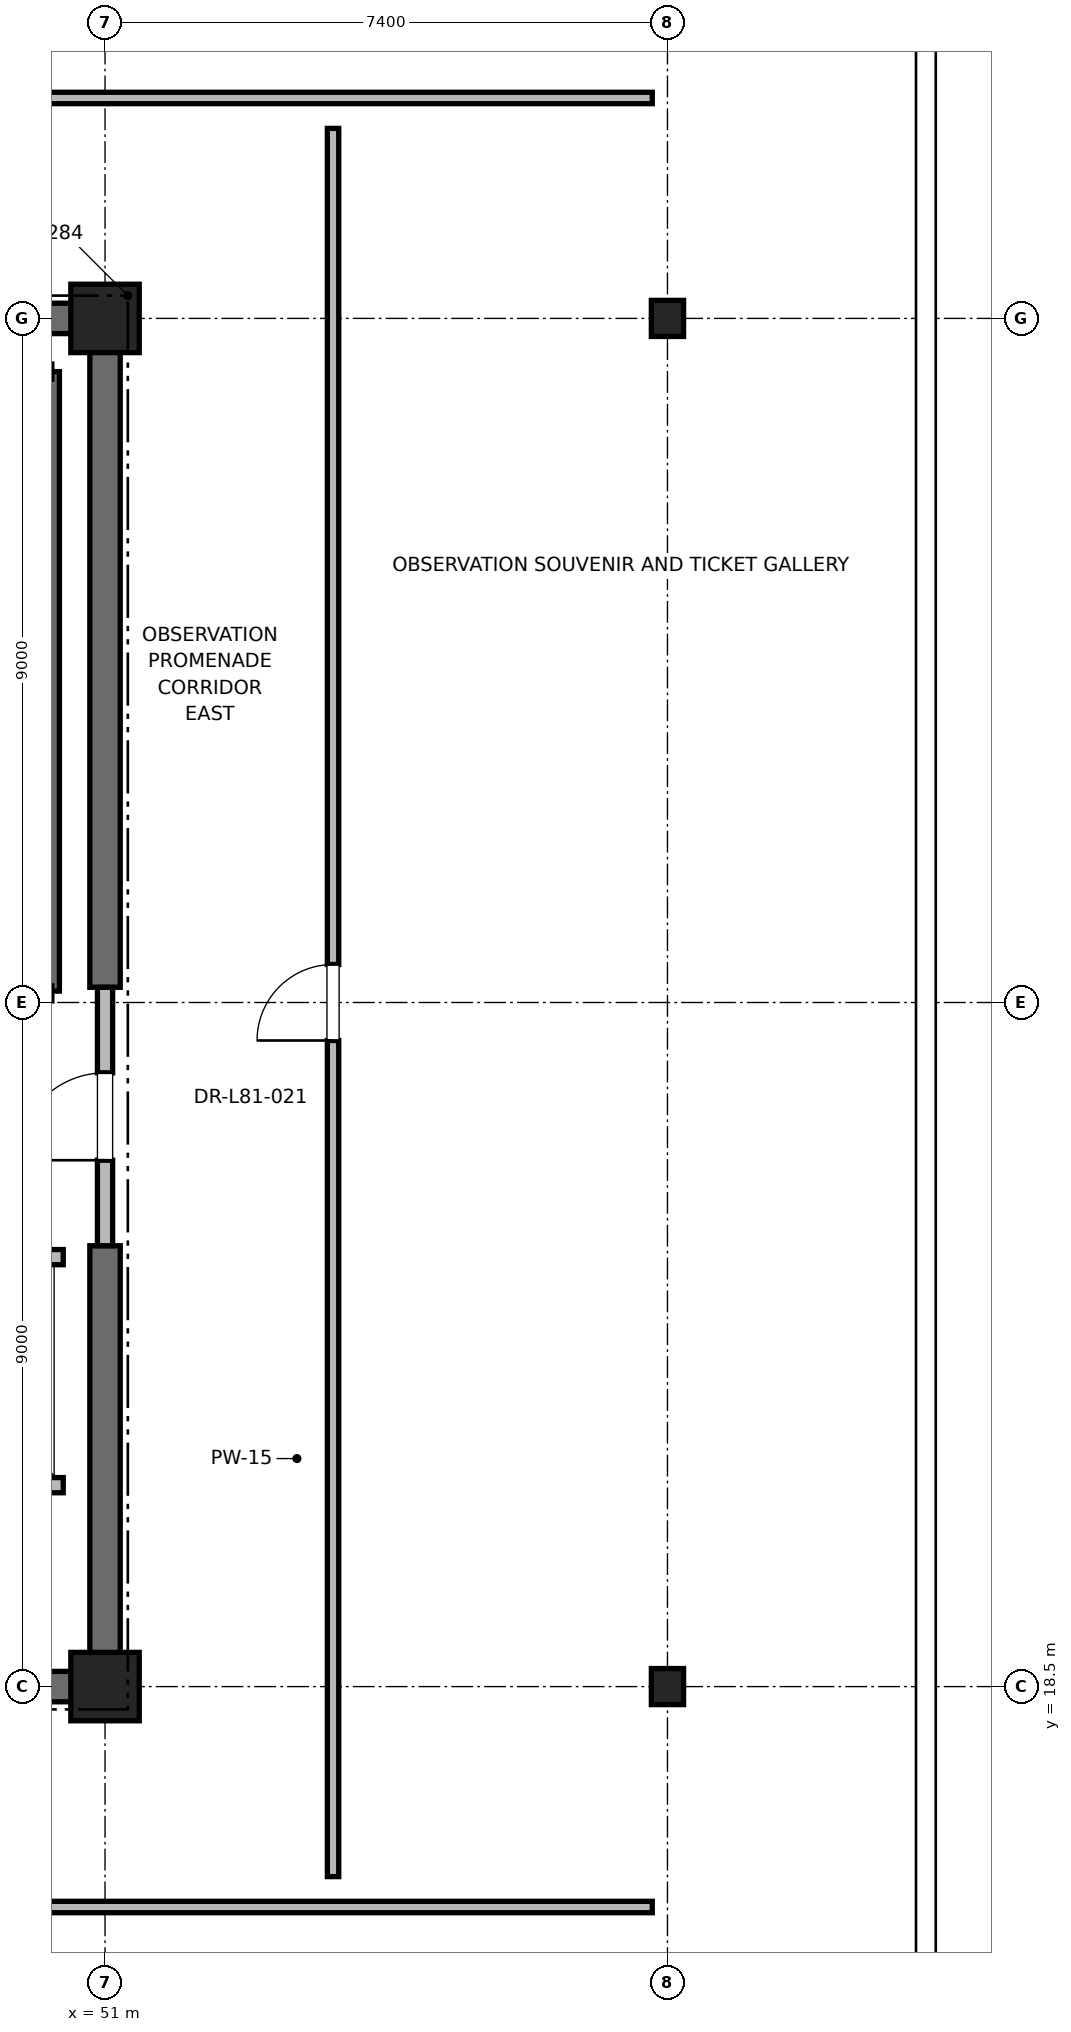
"""IFC4 building model, lengths in metres.
Left out: names, types, materials, properties, quantities, classifications, styles, units other than length and angle.
Written with IfcOpenShell. Run it as: python <this file> out.ifc"""

import sys

from ifc_helpers import new_model, si_unit, direction, frame, frame_2d, origin, origin_2d, place, context, subcontext, project, spatial, rectangle, i_section, extrude, element, fill, save


model = new_model("IFC4")
c1 = context("Model", 3, precision=1e-05, world=origin(), true_north=direction((0.0, 1.0)))
c2 = subcontext(c1, "Body", "Model", "MODEL_VIEW")
j1 = project(units=[si_unit("LENGTHUNIT", "METRE"), si_unit("PLANEANGLEUNIT", "RADIAN")], contexts=[c1])
p1 = place(None, origin())
s1 = spatial("IfcSite", under=j1, at=p1, CompositionType="ELEMENT")
p2 = place(p1, origin())
s2 = spatial("IfcBuilding", under=s1, at=p2, CompositionType="ELEMENT")
p3 = place(p2, frame((0.0, 0.0, 348.8)))
s3 = spatial("IfcBuildingStorey", under=s2, at=p3, CompositionType="ELEMENT", Elevation=348.8)
for number, where, z_axis, x_axis in (
    (1, (58.4, 18.5, 0.0), (0.0, 0.0, 1.0), (1.0, 0.0, 0.0)),
    (2, (58.4, 36.5, 0.0), (0.0, 0.0, 1.0), (1.0, 0.0, 0.0)),
):
    element("IfcColumn", number, at=place(p3, frame(where, z_axis=z_axis, x_axis=x_axis)), inside=s3, PredefinedType="COLUMN", context=c2, shape_type="SweptSolid", body=[
        extrude(i_section(OverallWidth=0.424, OverallDepth=0.475, WebThickness=0.048, FlangeThickness=0.077, FilletRadius=0.015, at=origin_2d()), origin(), (0.0, 0.0, 1.0), 5.5),
    ])
for number, where, z_axis, x_axis in (
    (3, (51.0, 18.5, 0.0), (0.0, 0.0, 1.0), (1.0, 0.0, 0.0)),
    (4, (51.0, 36.5, 0.0), (0.0, 0.0, 1.0), (1.0, 0.0, 0.0)),
):
    element("IfcColumn", number, at=place(p3, frame(where, z_axis=z_axis, x_axis=x_axis)), inside=s3, PredefinedType="PILASTER", context=c2, shape_type="SweptSolid", body=[
        extrude(rectangle(XDim=0.9, YDim=0.9, at=origin_2d()), origin(), (0.0, 0.0, 1.0), 5.5),
    ])
p4 = place(p3, frame((41.8, 18.5, 0.0), z_axis=(0.0, 0.0, 1.0), x_axis=(1.0, 0.0, 0.0)))
e5 = element("IfcWall", 5, at=p4, inside=s3, PredefinedType="SHEAR", context=c2, shape_type="SweptSolid", body=[
    extrude(rectangle(XDim=9.2, YDim=0.4, at=frame_2d((4.6, 0.0))), origin(), (0.0, 0.0, 1.0), 5.2),
])
for number, where, z_axis, x_axis in (
    (6, (45.2, 36.5, 0.0), (0.0, 0.0, 1.0), (1.0, 0.0, 0.0)),
    (7, (51.0, 18.5, 0.0), (0.0, 0.0, 1.0), (0.0, 1.0, 0.0)),
):
    element("IfcWall", number, at=place(p3, frame(where, z_axis=z_axis, x_axis=x_axis)), inside=s3, PredefinedType="SHEAR", context=c2, shape_type="SweptSolid", body=[
        extrude(rectangle(XDim=5.8, YDim=0.4, at=frame_2d((2.9, 0.0))), origin(), (0.0, 0.0, 1.0), 5.2),
    ])
p5 = place(p3, frame((51.0, 27.7, 0.0), z_axis=(0.0, 0.0, 1.0), x_axis=(0.0, 1.0, 0.0)))
e8 = element("IfcWall", 8, at=p5, inside=s3, PredefinedType="SHEAR", context=c2, shape_type="SweptSolid", body=[
    extrude(rectangle(XDim=8.8, YDim=0.4, at=frame_2d((4.4, 0.0))), origin(), (0.0, 0.0, 1.0), 5.2),
])
p6 = place(p3, frame((50.3, 27.65, 0.0), z_axis=(0.0, 0.0, 1.0), x_axis=(0.0, 1.0, 0.0)))
e9 = element("IfcWall", 9, at=p6, inside=s3, PredefinedType="SOLIDWALL", context=c2, shape_type="SweptSolid", body=[
    extrude(rectangle(XDim=8.15, YDim=0.2, at=frame_2d((4.075, 0.0))), origin(), (0.0, 0.0, 1.0), 5.2),
])
p7 = place(p3, frame((51.0, 24.3, 0.0), z_axis=(0.0, 0.0, 1.0), x_axis=(0.0, 1.0, 0.0)))
e10 = element("IfcWall", 10, at=p7, inside=s3, PredefinedType="PARTITIONING", context=c2, shape_type="SweptSolid", body=[
    extrude(rectangle(XDim=3.4, YDim=0.2, at=frame_2d((1.7, 0.0))), origin(), (0.0, 0.0, 1.0), 4.28),
])
p8 = place(p7, frame((1.125, 0.0, 0.0)))
e11 = element("IfcOpeningElement", 11, at=p8, cuts=e10, PredefinedType="OPENING", context=c2, shape_type="SweptSolid", body=[
    extrude(rectangle(XDim=1.15, YDim=2.2, at=frame_2d((0.575, 1.1))), frame((0.0, 0.1, 0.0), z_axis=(0.0, -1.0, 0.0), x_axis=(1.0, 0.0, 0.0)), (0.0, 0.0, 1.0), 0.2),
])
p9 = place(p3, frame((47.85, 21.15, 0.0), z_axis=(0.0, 0.0, 1.0), x_axis=(1.0, 0.0, 0.0)))
e12 = element("IfcWall", 12, at=p9, inside=s3, PredefinedType="SOLIDWALL", context=c2, shape_type="SweptSolid", body=[
    extrude(rectangle(XDim=2.6, YDim=0.2, at=frame_2d((1.3, 0.0))), origin(), (0.0, 0.0, 1.0), 5.2),
])
p10 = place(p3, frame((50.45, 24.15, 0.0), z_axis=(0.0, 0.0, 1.0), x_axis=(-1.0, 0.0, 0.0)))
e13 = element("IfcWall", 13, at=p10, inside=s3, PredefinedType="SOLIDWALL", context=c2, shape_type="SweptSolid", body=[
    extrude(rectangle(XDim=2.6, YDim=0.2, at=frame_2d((1.3, 0.0))), origin(), (0.0, 0.0, 1.0), 4.28),
])
p11 = place(p10, frame((0.75, 0.0, 0.0)))
e14 = element("IfcOpeningElement", 14, at=p11, cuts=e13, PredefinedType="OPENING", context=c2, shape_type="SweptSolid", body=[
    extrude(rectangle(XDim=1.1, YDim=2.2, at=frame_2d((0.55, 1.1))), frame((0.0, 0.1, 0.0), z_axis=(0.0, -1.0, 0.0), x_axis=(1.0, 0.0, 0.0)), (0.0, 0.0, 1.0), 0.2),
])
p12 = place(p3, frame((21.8, 39.4, 0.0), z_axis=(0.0, 0.0, 1.0), x_axis=(1.0, 0.0, 0.0)))
e15 = element("IfcWall", 15, at=p12, inside=s3, PredefinedType="PARTITIONING", context=c2, shape_type="SweptSolid", body=[
    extrude(rectangle(XDim=36.4, YDim=0.15, at=frame_2d((18.2, 0.0))), origin(), (0.0, 0.0, 1.0), 2.85),
])
p13 = place(p12, frame((17.7, 0.0, 0.0)))
e16 = element("IfcOpeningElement", 16, at=p13, cuts=e15, PredefinedType="OPENING", context=c2, shape_type="SweptSolid", body=[
    extrude(rectangle(XDim=1.0, YDim=2.15, at=frame_2d((0.5, 1.075))), frame((0.0, 0.075, 0.0), z_axis=(0.0, -1.0, 0.0), x_axis=(1.0, 0.0, 0.0)), (0.0, 0.0, 1.0), 0.15),
])
p14 = place(p3, frame((21.8, 15.6, 0.0), z_axis=(0.0, 0.0, 1.0), x_axis=(1.0, 0.0, 0.0)))
e17 = element("IfcWall", 17, at=p14, inside=s3, PredefinedType="PARTITIONING", context=c2, shape_type="SweptSolid", body=[
    extrude(rectangle(XDim=36.4, YDim=0.15, at=frame_2d((18.2, 0.0))), origin(), (0.0, 0.0, 1.0), 2.85),
])
p15 = place(p14, frame((17.7, 0.0, 0.0)))
e18 = element("IfcOpeningElement", 18, at=p15, cuts=e17, PredefinedType="OPENING", context=c2, shape_type="SweptSolid", body=[
    extrude(rectangle(XDim=1.0, YDim=2.15, at=frame_2d((0.5, 1.075))), frame((0.0, 0.075, 0.0), z_axis=(0.0, -1.0, 0.0), x_axis=(1.0, 0.0, 0.0)), (0.0, 0.0, 1.0), 0.15),
])
p16 = place(p3, frame((54.0, 16.0, 0.0), z_axis=(0.0, 0.0, 1.0), x_axis=(0.0, 1.0, 0.0)))
e19 = element("IfcWall", 19, at=p16, inside=s3, PredefinedType="PARTITIONING", context=c2, shape_type="SweptSolid", body=[
    extrude(rectangle(XDim=23.0, YDim=0.15, at=frame_2d((11.5, 0.0))), origin(), (0.0, 0.0, 1.0), 2.85),
])
p17 = place(p16, frame((11.0, 0.0, 0.0)))
e20 = element("IfcOpeningElement", 20, at=p17, cuts=e19, PredefinedType="OPENING", context=c2, shape_type="SweptSolid", body=[
    extrude(rectangle(XDim=1.0, YDim=2.15, at=frame_2d((0.5, 1.075))), frame((0.0, 0.075, 0.0), z_axis=(0.0, -1.0, 0.0), x_axis=(1.0, 0.0, 0.0)), (0.0, 0.0, 1.0), 0.15),
])
p18 = place(p8, origin())
e21 = element("IfcDoor", 21, at=p18, inside=s3, OperationType="SINGLE_SWING_LEFT", PredefinedType="DOOR", context=c2, shape_type="SweptSolid", body=[
    extrude(rectangle(XDim=1.15, YDim=2.2, at=frame_2d((0.575, 1.1))), frame((0.0, 0.025, 0.0), z_axis=(0.0, -1.0, 0.0), x_axis=(1.0, 0.0, 0.0)), (0.0, 0.0, 1.0), 0.05),
])
fill(e11, e21)
p19 = place(p17, origin())
e22 = element("IfcDoor", 22, at=p19, inside=s3, OperationType="SINGLE_SWING_LEFT", PredefinedType="DOOR", context=c2, shape_type="SweptSolid", body=[
    extrude(rectangle(XDim=1.0, YDim=2.15, at=frame_2d((0.5, 1.075))), frame((0.0, 0.025, 0.0), z_axis=(0.0, -1.0, 0.0), x_axis=(1.0, 0.0, 0.0)), (0.0, 0.0, 1.0), 0.05),
])
fill(e20, e22)
save(model, sys.argv[1])
